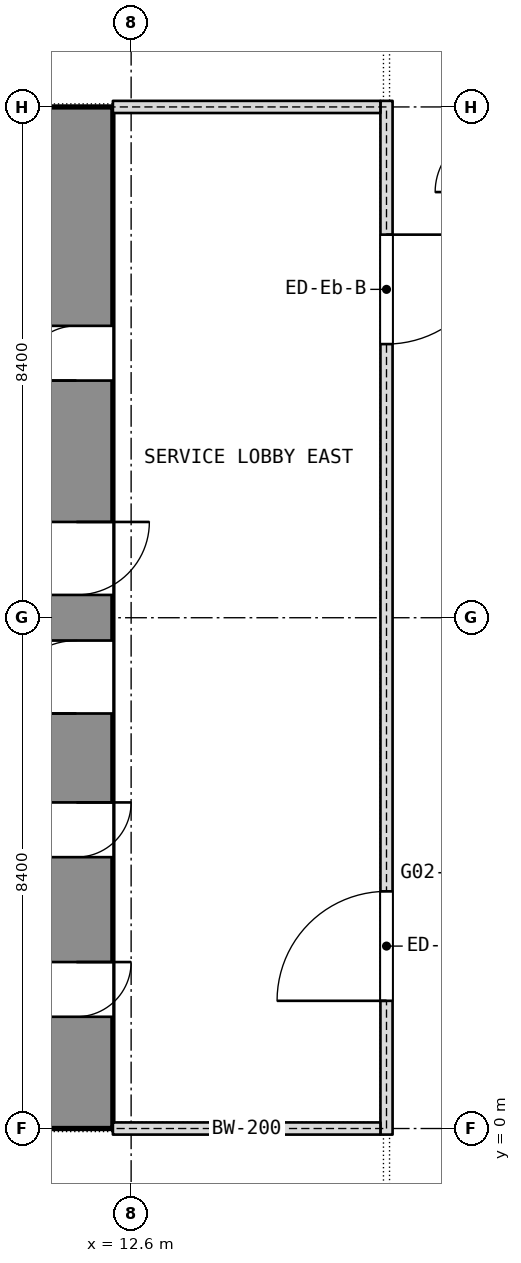
"""IFC4 building model, lengths in metres.
Left out: names, types, materials, properties, quantities, classifications, styles, units other than length and angle.
Written with IfcOpenShell. Run it as: python <this file> out.ifc"""

import sys

from ifc_helpers import new_model, si_unit, direction, frame, frame_2d, origin, place, context, subcontext, project, spatial, rectangle, extrude, element, fill, save


model = new_model("IFC4")
c1 = context("Model", 3, precision=1e-05, world=origin(), true_north=direction((0.0, 1.0)))
c2 = subcontext(c1, "Body", "Model", "MODEL_VIEW")
j1 = project(units=[si_unit("LENGTHUNIT", "METRE"), si_unit("PLANEANGLEUNIT", "RADIAN")], contexts=[c1])
p1 = place(None, origin())
s1 = spatial("IfcSite", under=j1, at=p1, CompositionType="ELEMENT")
p2 = place(p1, origin())
s2 = spatial("IfcBuilding", under=s1, at=p2, CompositionType="ELEMENT")
p3 = place(p2, frame((0.0, 0.0, 43.7)))
s3 = spatial("IfcBuildingStorey", under=s2, at=p3, CompositionType="ELEMENT", Elevation=43.7)
p4 = place(p3, frame((11.7, 0.0, 0.0), z_axis=(0.0, 0.0, 1.0), x_axis=(0.0, 1.0, 0.0)))
e1 = element("IfcWall", 1, at=p4, inside=s3, PredefinedType="SHEAR", context=c2, shape_type="SweptSolid", body=[
    extrude(rectangle(XDim=16.8, YDim=1.2, at=frame_2d((8.4, 0.0))), origin(), (0.0, 0.0, 1.0), 3.6),
])
p5 = place(p4, frame((1.837, 0.0, 0.0)))
e2 = element("IfcOpeningElement", 2, at=p5, cuts=e1, PredefinedType="OPENING", context=c2, shape_type="SweptSolid", body=[
    extrude(rectangle(XDim=0.9, YDim=2.1, at=frame_2d((0.45, 1.05))), frame((0.0, 0.6, 0.0), z_axis=(0.0, -1.0, 0.0), x_axis=(1.0, 0.0, 0.0)), (0.0, 0.0, 1.0), 1.2),
])
p6 = place(p4, frame((4.462, 0.0, 0.0)))
e3 = element("IfcOpeningElement", 3, at=p6, cuts=e1, PredefinedType="OPENING", context=c2, shape_type="SweptSolid", body=[
    extrude(rectangle(XDim=0.9, YDim=2.1, at=frame_2d((0.45, 1.05))), frame((0.0, 0.6, 0.0), z_axis=(0.0, -1.0, 0.0), x_axis=(1.0, 0.0, 0.0)), (0.0, 0.0, 1.0), 1.2),
])
p7 = place(p4, frame((6.825, 0.0, 0.0)))
e4 = element("IfcOpeningElement", 4, at=p7, cuts=e1, PredefinedType="OPENING", context=c2, shape_type="SweptSolid", body=[
    extrude(rectangle(XDim=1.2, YDim=2.1, at=frame_2d((0.6, 1.05))), frame((0.0, 0.6, 0.0), z_axis=(0.0, -1.0, 0.0), x_axis=(1.0, 0.0, 0.0)), (0.0, 0.0, 1.0), 1.2),
])
p8 = place(p4, frame((12.3, 0.0, 0.0)))
e5 = element("IfcOpeningElement", 5, at=p8, cuts=e1, PredefinedType="OPENING", context=c2, shape_type="SweptSolid", body=[
    extrude(rectangle(XDim=0.9, YDim=2.1, at=frame_2d((0.45, 1.05))), frame((0.0, 0.6, 0.0), z_axis=(0.0, -1.0, 0.0), x_axis=(1.0, 0.0, 0.0)), (0.0, 0.0, 1.0), 1.2),
])
p9 = place(p4, frame((8.775, 0.0, 0.0)))
e6 = element("IfcOpeningElement", 6, at=p9, cuts=e1, PredefinedType="OPENING", context=c2, shape_type="SweptSolid", body=[
    extrude(rectangle(XDim=1.2, YDim=2.1, at=frame_2d((0.6, 1.05))), frame((0.0, 0.6, 0.0), z_axis=(0.0, -1.0, 0.0), x_axis=(1.0, 0.0, 0.0)), (0.0, 0.0, 1.0), 1.2),
])
p10 = place(p3, frame((16.8, -0.1, 0.0), z_axis=(0.0, 0.0, 1.0), x_axis=(0.0, 1.0, 0.0)))
e7 = element("IfcWall", 7, at=p10, inside=s3, PredefinedType="PARTITIONING", context=c2, shape_type="SweptSolid", body=[
    extrude(rectangle(XDim=17.0, YDim=0.2, at=frame_2d((8.5, 0.0))), origin(), (0.0, 0.0, 1.0), 3.34),
])
p11 = place(p10, frame((2.2, 0.0, 0.0)))
e8 = element("IfcOpeningElement", 8, at=p11, cuts=e7, PredefinedType="OPENING", context=c2, shape_type="SweptSolid", body=[
    extrude(rectangle(XDim=1.8, YDim=2.1, at=frame_2d((0.9, 1.05))), frame((0.0, 0.1, 0.0), z_axis=(0.0, -1.0, 0.0), x_axis=(1.0, 0.0, 0.0)), (0.0, 0.0, 1.0), 0.2),
])
p12 = place(p10, frame((13.0, 0.0, 0.0)))
e9 = element("IfcOpeningElement", 9, at=p12, cuts=e7, PredefinedType="OPENING", context=c2, shape_type="SweptSolid", body=[
    extrude(rectangle(XDim=1.8, YDim=2.1, at=frame_2d((0.9, 1.05))), frame((0.0, 0.1, 0.0), z_axis=(0.0, -1.0, 0.0), x_axis=(1.0, 0.0, 0.0)), (0.0, 0.0, 1.0), 0.2),
])
for number, where, z_axis, x_axis in (
    (10, (12.3, 0.0, 0.0), (0.0, 0.0, 1.0), (1.0, 0.0, 0.0)),
    (11, (12.3, 16.8, 0.0), (0.0, 0.0, 1.0), (1.0, 0.0, 0.0)),
):
    element("IfcWall", number, at=place(p3, frame(where, z_axis=z_axis, x_axis=x_axis)), inside=s3, PredefinedType="PARTITIONING", context=c2, shape_type="SweptSolid", body=[
        extrude(rectangle(XDim=4.4, YDim=0.2, at=frame_2d((2.2, 0.0))), origin(), (0.0, 0.0, 1.0), 2.84),
    ])
p13 = place(p5, origin())
e12 = element("IfcDoor", 12, at=p13, inside=s3, OperationType="SINGLE_SWING_LEFT", PredefinedType="DOOR", context=c2, shape_type="SweptSolid", body=[
    extrude(rectangle(XDim=0.9, YDim=2.1, at=frame_2d((0.45, 1.05))), frame((0.0, 0.025, 0.0), z_axis=(0.0, -1.0, 0.0), x_axis=(1.0, 0.0, 0.0)), (0.0, 0.0, 1.0), 0.05),
])
fill(e2, e12)
p14 = place(p6, origin())
e13 = element("IfcDoor", 13, at=p14, inside=s3, OperationType="SINGLE_SWING_LEFT", PredefinedType="DOOR", context=c2, shape_type="SweptSolid", body=[
    extrude(rectangle(XDim=0.9, YDim=2.1, at=frame_2d((0.45, 1.05))), frame((0.0, 0.025, 0.0), z_axis=(0.0, -1.0, 0.0), x_axis=(1.0, 0.0, 0.0)), (0.0, 0.0, 1.0), 0.05),
])
fill(e3, e13)
p15 = place(p7, origin())
e14 = element("IfcDoor", 14, at=p15, inside=s3, OperationType="SINGLE_SWING_LEFT", PredefinedType="DOOR", context=c2, shape_type="SweptSolid", body=[
    extrude(rectangle(XDim=1.2, YDim=2.1, at=frame_2d((0.6, 1.05))), frame((0.0, 0.025, 0.0), z_axis=(0.0, -1.0, 0.0), x_axis=(1.0, 0.0, 0.0)), (0.0, 0.0, 1.0), 0.05),
])
fill(e4, e14)
p16 = place(p8, origin())
e15 = element("IfcDoor", 15, at=p16, inside=s3, OperationType="SINGLE_SWING_LEFT", PredefinedType="DOOR", context=c2, shape_type="SweptSolid", body=[
    extrude(rectangle(XDim=0.9, YDim=2.1, at=frame_2d((0.45, 1.05))), frame((0.0, 0.025, 0.0), z_axis=(0.0, -1.0, 0.0), x_axis=(1.0, 0.0, 0.0)), (0.0, 0.0, 1.0), 0.05),
])
fill(e5, e15)
p17 = place(p9, origin())
e16 = element("IfcDoor", 16, at=p17, inside=s3, OperationType="SINGLE_SWING_LEFT", PredefinedType="DOOR", context=c2, shape_type="SweptSolid", body=[
    extrude(rectangle(XDim=1.2, YDim=2.1, at=frame_2d((0.6, 1.05))), frame((0.0, 0.025, 0.0), z_axis=(0.0, -1.0, 0.0), x_axis=(1.0, 0.0, 0.0)), (0.0, 0.0, 1.0), 0.05),
])
fill(e6, e16)
p18 = place(p11, origin())
e17 = element("IfcDoor", 17, at=p18, inside=s3, OperationType="DOUBLE_DOOR_SINGLE_SWING", PredefinedType="DOOR", context=c2, shape_type="SweptSolid", body=[
    extrude(rectangle(XDim=1.8, YDim=2.1, at=frame_2d((0.9, 1.05))), frame((0.0, 0.025, 0.0), z_axis=(0.0, -1.0, 0.0), x_axis=(1.0, 0.0, 0.0)), (0.0, 0.0, 1.0), 0.05),
])
fill(e8, e17)
p19 = place(p12, origin())
e18 = element("IfcDoor", 18, at=p19, inside=s3, OperationType="DOUBLE_DOOR_SINGLE_SWING", PredefinedType="DOOR", context=c2, shape_type="SweptSolid", body=[
    extrude(rectangle(XDim=1.8, YDim=2.1, at=frame_2d((0.9, 1.05))), frame((0.0, 0.025, 0.0), z_axis=(0.0, -1.0, 0.0), x_axis=(1.0, 0.0, 0.0)), (0.0, 0.0, 1.0), 0.05),
])
fill(e9, e18)
save(model, sys.argv[1])
